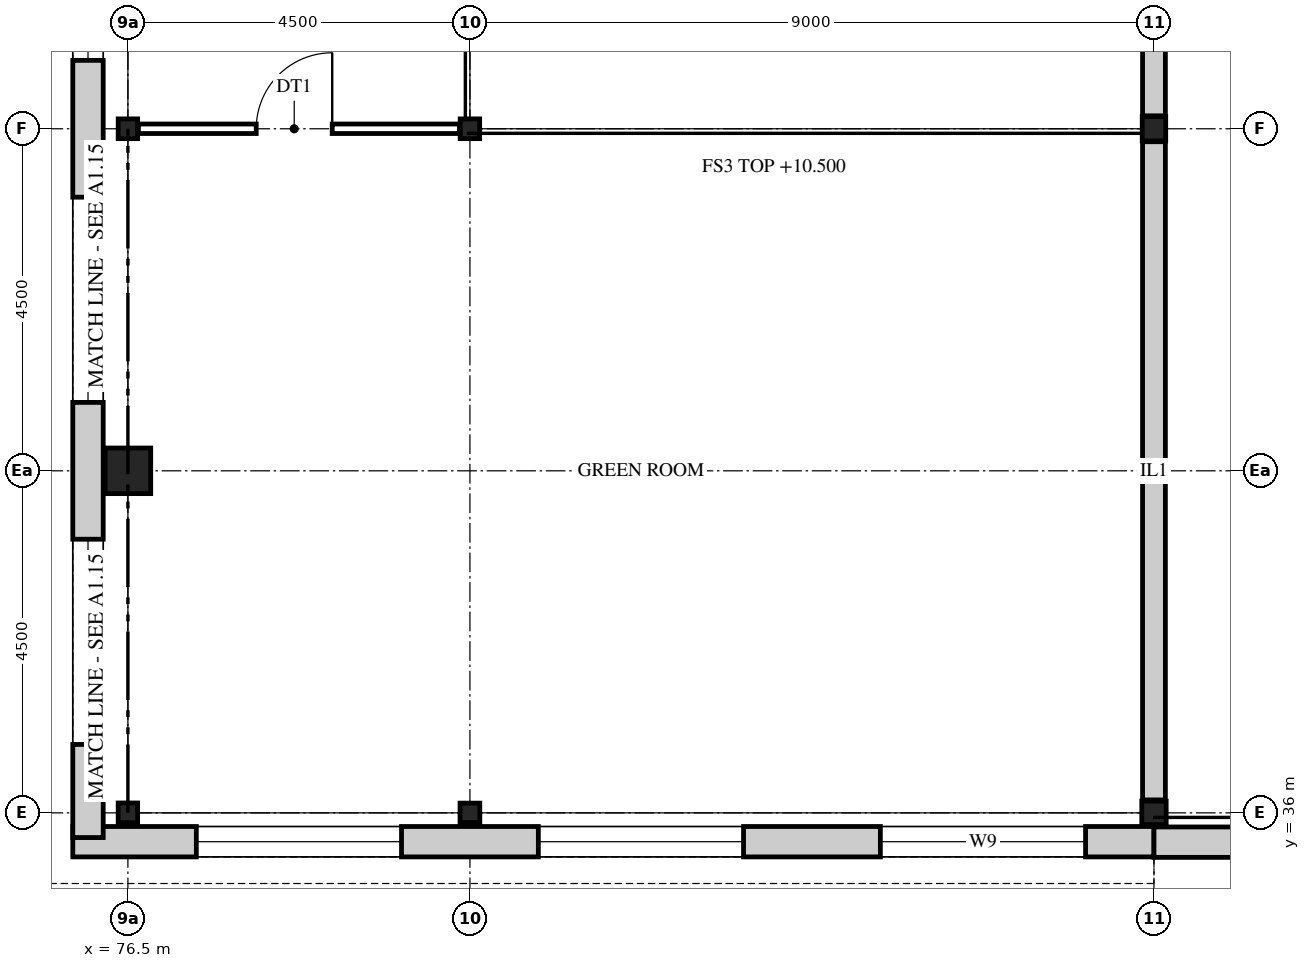
"""IFC4 building model, lengths in metres.
Left out: names, types, materials, properties, quantities, classifications, styles, units other than length and angle.
Written with IfcOpenShell. Run it as: python <this file> out.ifc"""

import sys

from ifc_helpers import new_model, si_unit, direction, frame, frame_2d, origin, origin_2d, place, context, subcontext, project, spatial, polyline, rectangle, i_section, outline, extrude, element, fill, save


model = new_model("IFC4")
c1 = context("Model", 3, precision=1e-05, world=origin(), true_north=direction((0.0, 1.0)))
c2 = subcontext(c1, "Body", "Model", "MODEL_VIEW")
j1 = project(units=[si_unit("LENGTHUNIT", "METRE"), si_unit("PLANEANGLEUNIT", "RADIAN")], contexts=[c1])
p1 = place(None, origin())
s1 = spatial("IfcSite", under=j1, at=p1, CompositionType="ELEMENT")
p2 = place(p1, origin())
s2 = spatial("IfcBuilding", under=s1, at=p2, CompositionType="ELEMENT")
p3 = place(p2, frame((0.0, 0.0, 10.5)))
s3 = spatial("IfcBuildingStorey", under=s2, at=p3, CompositionType="ELEMENT", Elevation=10.5)
for number, where, z_axis, x_axis in (
    (1, (76.5, 36.0, 0.0), (0.0, 0.0, 1.0), (1.0, 0.0, 0.0)),
    (2, (76.5, 45.0, 0.0), (0.0, 0.0, 1.0), (1.0, 0.0, 0.0)),
    (3, (81.0, 36.0, 0.0), (0.0, 0.0, 1.0), (0.0, 1.0, 0.0)),
    (4, (81.0, 45.0, 0.0), (0.0, 0.0, 1.0), (1.0, 0.0, 0.0)),
):
    element("IfcColumn", number, at=place(p3, frame(where, z_axis=z_axis, x_axis=x_axis)), inside=s3, PredefinedType="COLUMN", context=c2, shape_type="SweptSolid", body=[
        extrude(i_section(OverallWidth=0.256, OverallDepth=0.26, WebThickness=0.01, FlangeThickness=0.017, FilletRadius=0.014, at=origin_2d()), origin(), (0.0, 0.0, 1.0), 4.5),
    ])
for number, where, z_axis, x_axis in (
    (5, (90.0, 36.0, 0.0), (0.0, 0.0, 1.0), (0.0, 1.0, 0.0)),
    (6, (90.0, 45.0, 0.0), (0.0, 0.0, 1.0), (1.0, 0.0, 0.0)),
):
    element("IfcColumn", number, at=place(p3, frame(where, z_axis=z_axis, x_axis=x_axis)), inside=s3, PredefinedType="COLUMN", context=c2, shape_type="SweptSolid", body=[
        extrude(i_section(OverallWidth=0.309, OverallDepth=0.321, WebThickness=0.014, FlangeThickness=0.022, FilletRadius=0.017, at=origin_2d()), origin(), (0.0, 0.0, 1.0), 4.5),
    ])
p4 = place(p3, frame((76.5, 40.5, 0.0), z_axis=(0.0, 0.0, 1.0), x_axis=(1.0, 0.0, 0.0)))
e7 = element("IfcColumn", 7, at=p4, inside=s3, PredefinedType="COLUMN", context=c2, shape_type="SweptSolid", body=[
    extrude(rectangle(XDim=0.6, YDim=0.6, at=origin_2d()), origin(), (0.0, 0.0, 1.0), 4.5),
])
p5 = place(p3, frame((90.0, 35.621, 0.0), z_axis=(0.0, 0.0, 1.0), x_axis=(-1.0, 0.0, 0.0)))
e8 = element("IfcWall", 8, at=p5, inside=s3, PredefinedType="STANDARD", context=c2, shape_type="SweptSolid", body=[
    extrude(rectangle(XDim=14.225, YDim=0.4, at=frame_2d((7.113, 0.0))), origin(), (0.0, 0.0, 1.0), 4.5),
])
p6 = place(p5, frame((9.9, 0.0, 0.9)))
e9 = element("IfcOpeningElement", 9, at=p6, cuts=e8, PredefinedType="OPENING", context=c2, shape_type="SweptSolid", body=[
    extrude(rectangle(XDim=2.7, YDim=2.8, at=frame_2d((1.35, 1.4))), frame((0.0, 0.21, 0.0), z_axis=(0.0, -1.0, 0.0), x_axis=(1.0, 0.0, 0.0)), (0.0, 0.0, 1.0), 0.42),
])
p7 = place(p5, frame((5.4, 0.0, 0.9)))
e10 = element("IfcOpeningElement", 10, at=p7, cuts=e8, PredefinedType="OPENING", context=c2, shape_type="SweptSolid", body=[
    extrude(rectangle(XDim=2.7, YDim=2.8, at=frame_2d((1.35, 1.4))), frame((0.0, 0.21, 0.0), z_axis=(0.0, -1.0, 0.0), x_axis=(1.0, 0.0, 0.0)), (0.0, 0.0, 1.0), 0.42),
])
p8 = place(p5, frame((0.9, 0.0, 0.9)))
e11 = element("IfcOpeningElement", 11, at=p8, cuts=e8, PredefinedType="OPENING", context=c2, shape_type="SweptSolid", body=[
    extrude(rectangle(XDim=2.7, YDim=2.8, at=frame_2d((1.35, 1.4))), frame((0.0, 0.21, 0.0), z_axis=(0.0, -1.0, 0.0), x_axis=(1.0, 0.0, 0.0)), (0.0, 0.0, 1.0), 0.42),
])
p9 = place(p3, frame((75.975, 35.675, 0.0), z_axis=(0.0, 0.0, 1.0), x_axis=(0.0, 1.0, 0.0)))
e12 = element("IfcWall", 12, at=p9, inside=s3, PredefinedType="STANDARD", context=c2, shape_type="SweptSolid", body=[
    extrude(rectangle(XDim=36.65, YDim=0.4, at=frame_2d((18.325, 0.0))), origin(), (0.0, 0.0, 1.0), 4.5),
])
p10 = place(p9, frame((1.225, 0.0, 0.9)))
e13 = element("IfcOpeningElement", 13, at=p10, cuts=e12, PredefinedType="OPENING", context=c2, shape_type="SweptSolid", body=[
    extrude(rectangle(XDim=2.7, YDim=2.8, at=frame_2d((1.35, 1.4))), frame((0.0, 0.21, 0.0), z_axis=(0.0, -1.0, 0.0), x_axis=(1.0, 0.0, 0.0)), (0.0, 0.0, 1.0), 0.42),
])
p11 = place(p9, frame((5.725, 0.0, 0.9)))
e14 = element("IfcOpeningElement", 14, at=p11, cuts=e12, PredefinedType="OPENING", context=c2, shape_type="SweptSolid", body=[
    extrude(rectangle(XDim=2.7, YDim=2.8, at=frame_2d((1.35, 1.4))), frame((0.0, 0.21, 0.0), z_axis=(0.0, -1.0, 0.0), x_axis=(1.0, 0.0, 0.0)), (0.0, 0.0, 1.0), 0.42),
])
p12 = place(p9, frame((10.225, 0.0, 0.9)))
e15 = element("IfcOpeningElement", 15, at=p12, cuts=e12, PredefinedType="OPENING", context=c2, shape_type="SweptSolid", body=[
    extrude(rectangle(XDim=2.7, YDim=2.8, at=frame_2d((1.35, 1.4))), frame((0.0, 0.21, 0.0), z_axis=(0.0, -1.0, 0.0), x_axis=(1.0, 0.0, 0.0)), (0.0, 0.0, 1.0), 0.42),
])
p13 = place(p9, frame((14.725, 0.0, 0.9)))
e16 = element("IfcOpeningElement", 16, at=p13, cuts=e12, PredefinedType="OPENING", context=c2, shape_type="SweptSolid", body=[
    extrude(rectangle(XDim=2.7, YDim=2.8, at=frame_2d((1.35, 1.4))), frame((0.0, 0.21, 0.0), z_axis=(0.0, -1.0, 0.0), x_axis=(1.0, 0.0, 0.0)), (0.0, 0.0, 1.0), 0.42),
])
p14 = place(p9, frame((19.225, 0.0, 0.9)))
e17 = element("IfcOpeningElement", 17, at=p14, cuts=e12, PredefinedType="OPENING", context=c2, shape_type="SweptSolid", body=[
    extrude(rectangle(XDim=2.7, YDim=2.8, at=frame_2d((1.35, 1.4))), frame((0.0, 0.21, 0.0), z_axis=(0.0, -1.0, 0.0), x_axis=(1.0, 0.0, 0.0)), (0.0, 0.0, 1.0), 0.42),
])
p15 = place(p9, frame((23.725, 0.0, 0.9)))
e18 = element("IfcOpeningElement", 18, at=p15, cuts=e12, PredefinedType="OPENING", context=c2, shape_type="SweptSolid", body=[
    extrude(rectangle(XDim=2.7, YDim=2.8, at=frame_2d((1.35, 1.4))), frame((0.0, 0.21, 0.0), z_axis=(0.0, -1.0, 0.0), x_axis=(1.0, 0.0, 0.0)), (0.0, 0.0, 1.0), 0.42),
])
p16 = place(p9, frame((28.225, 0.0, 0.9)))
e19 = element("IfcOpeningElement", 19, at=p16, cuts=e12, PredefinedType="OPENING", context=c2, shape_type="SweptSolid", body=[
    extrude(rectangle(XDim=2.7, YDim=2.8, at=frame_2d((1.35, 1.4))), frame((0.0, 0.21, 0.0), z_axis=(0.0, -1.0, 0.0), x_axis=(1.0, 0.0, 0.0)), (0.0, 0.0, 1.0), 0.42),
])
p17 = place(p9, frame((32.725, 0.0, 0.9)))
e20 = element("IfcOpeningElement", 20, at=p17, cuts=e12, PredefinedType="OPENING", context=c2, shape_type="SweptSolid", body=[
    extrude(rectangle(XDim=2.7, YDim=2.8, at=frame_2d((1.35, 1.4))), frame((0.0, 0.21, 0.0), z_axis=(0.0, -1.0, 0.0), x_axis=(1.0, 0.0, 0.0)), (0.0, 0.0, 1.0), 0.42),
])
p18 = place(p3, frame((108.58, 35.615, 0.0), z_axis=(0.0, 0.0, 1.0), x_axis=(-1.0, 0.0, 0.0)))
e21 = element("IfcWall", 21, at=p18, inside=s3, PredefinedType="STANDARD", context=c2, shape_type="SweptSolid", body=[
    extrude(rectangle(XDim=18.58, YDim=0.4, at=frame_2d((9.29, 0.0))), origin(), (0.0, 0.0, 1.0), 3.4),
])
p19 = place(p3, frame((108.0, 35.615, 3.4), z_axis=(0.0, 0.0, 1.0), x_axis=(-1.0, 0.0, 0.0)))
e22 = element("IfcWall", 22, at=p19, inside=s3, PredefinedType="STANDARD", context=c2, shape_type="SweptSolid", body=[
    extrude(outline(polyline([(0.0, 0.0), (18.0, 0.0), (18.0, 0.1), (15.75, 4.191), (13.5, 5.937), (11.25, 6.823), (9.0, 7.1), (6.75, 6.823), (4.5, 5.937), (2.25, 4.191), (0.0, 0.1), (0.0, 0.0)])), frame((0.0, 0.2, 0.0), z_axis=(0.0, -1.0, 0.0), x_axis=(1.0, 0.0, 0.0)), (0.0, 0.0, 1.0), 0.4),
])
for number, where, z_axis, x_axis in (
    (23, (90.0, 36.17, 0.0), (0.0, 0.0, 1.0), (0.0, 1.0, 0.0)),
    (24, (90.0, 45.17, 0.0), (0.0, 0.0, 1.0), (0.0, 1.0, 0.0)),
):
    element("IfcWall", number, at=place(p3, frame(where, z_axis=z_axis, x_axis=x_axis)), inside=s3, PredefinedType="STANDARD", context=c2, shape_type="SweptSolid", body=[
        extrude(rectangle(XDim=8.659, YDim=0.3, at=frame_2d((4.33, 0.0))), origin(), (0.0, 0.0, 1.0), 3.346),
    ])
p20 = place(p3, frame((76.638, 45.0, 0.0), z_axis=(0.0, 0.0, 1.0), x_axis=(1.0, 0.0, 0.0)))
e25 = element("IfcWall", 25, at=p20, inside=s3, PredefinedType="PARTITIONING", context=c2, shape_type="SweptSolid", body=[
    extrude(rectangle(XDim=4.224, YDim=0.125, at=frame_2d((2.112, 0.0))), origin(), (0.0, 0.0, 1.0), 3.822),
])
p21 = place(p20, frame((1.55, 0.0, 0.0)))
e26 = element("IfcOpeningElement", 26, at=p21, cuts=e25, PredefinedType="OPENING", context=c2, shape_type="SweptSolid", body=[
    extrude(rectangle(XDim=1.0, YDim=2.1, at=frame_2d((0.5, 1.05))), frame((0.0, 0.073, 0.0), z_axis=(0.0, -1.0, 0.0), x_axis=(1.0, 0.0, 0.0)), (0.0, 0.0, 1.0), 0.145),
])
p22 = place(p6, origin())
e27 = element("IfcWindow", 27, at=p22, inside=s3, PartitioningType="SINGLE_PANEL", PredefinedType="WINDOW", context=c2, shape_type="SweptSolid", body=[
    extrude(rectangle(XDim=2.7, YDim=2.8, at=frame_2d((1.35, 1.4))), frame((0.0, 0.03, 0.0), z_axis=(0.0, -1.0, 0.0), x_axis=(1.0, 0.0, 0.0)), (0.0, 0.0, 1.0), 0.06),
])
fill(e9, e27)
p23 = place(p7, origin())
e28 = element("IfcWindow", 28, at=p23, inside=s3, PartitioningType="SINGLE_PANEL", PredefinedType="WINDOW", context=c2, shape_type="SweptSolid", body=[
    extrude(rectangle(XDim=2.7, YDim=2.8, at=frame_2d((1.35, 1.4))), frame((0.0, 0.03, 0.0), z_axis=(0.0, -1.0, 0.0), x_axis=(1.0, 0.0, 0.0)), (0.0, 0.0, 1.0), 0.06),
])
fill(e10, e28)
p24 = place(p8, origin())
e29 = element("IfcWindow", 29, at=p24, inside=s3, PartitioningType="SINGLE_PANEL", PredefinedType="WINDOW", context=c2, shape_type="SweptSolid", body=[
    extrude(rectangle(XDim=2.7, YDim=2.8, at=frame_2d((1.35, 1.4))), frame((0.0, 0.03, 0.0), z_axis=(0.0, -1.0, 0.0), x_axis=(1.0, 0.0, 0.0)), (0.0, 0.0, 1.0), 0.06),
])
fill(e11, e29)
p25 = place(p10, origin())
e30 = element("IfcWindow", 30, at=p25, inside=s3, PartitioningType="SINGLE_PANEL", PredefinedType="WINDOW", context=c2, shape_type="SweptSolid", body=[
    extrude(rectangle(XDim=2.7, YDim=2.8, at=frame_2d((1.35, 1.4))), frame((0.0, 0.03, 0.0), z_axis=(0.0, -1.0, 0.0), x_axis=(1.0, 0.0, 0.0)), (0.0, 0.0, 1.0), 0.06),
])
fill(e13, e30)
p26 = place(p11, origin())
e31 = element("IfcWindow", 31, at=p26, inside=s3, PartitioningType="SINGLE_PANEL", PredefinedType="WINDOW", context=c2, shape_type="SweptSolid", body=[
    extrude(rectangle(XDim=2.7, YDim=2.8, at=frame_2d((1.35, 1.4))), frame((0.0, 0.03, 0.0), z_axis=(0.0, -1.0, 0.0), x_axis=(1.0, 0.0, 0.0)), (0.0, 0.0, 1.0), 0.06),
])
fill(e14, e31)
p27 = place(p12, origin())
e32 = element("IfcWindow", 32, at=p27, inside=s3, PartitioningType="SINGLE_PANEL", PredefinedType="WINDOW", context=c2, shape_type="SweptSolid", body=[
    extrude(rectangle(XDim=2.7, YDim=2.8, at=frame_2d((1.35, 1.4))), frame((0.0, 0.03, 0.0), z_axis=(0.0, -1.0, 0.0), x_axis=(1.0, 0.0, 0.0)), (0.0, 0.0, 1.0), 0.06),
])
fill(e15, e32)
p28 = place(p21, frame((1.0, 0.0, 0.0), z_axis=(0.0, 0.0, 1.0), x_axis=(-1.0, 0.0, 0.0)))
e33 = element("IfcDoor", 33, at=p28, inside=s3, OperationType="SINGLE_SWING_RIGHT", PredefinedType="DOOR", context=c2, shape_type="SweptSolid", body=[
    extrude(rectangle(XDim=1.0, YDim=2.1, at=frame_2d((0.5, 1.05))), frame((0.0, 0.025, 0.0), z_axis=(0.0, -1.0, 0.0), x_axis=(1.0, 0.0, 0.0)), (0.0, 0.0, 1.0), 0.05),
])
fill(e26, e33)
save(model, sys.argv[1])
